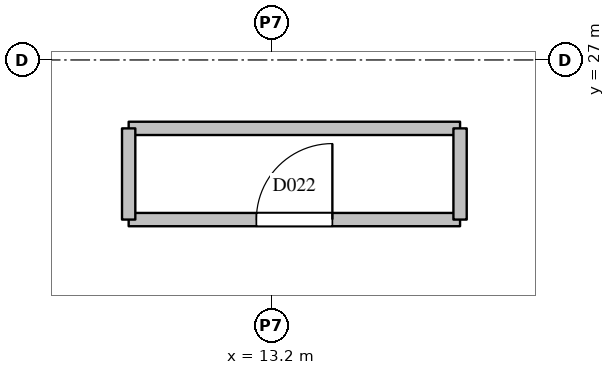
"""IFC4 building model, lengths in metres.
Left out: names, types, materials, properties, quantities, classifications, styles, units other than length and angle.
Written with IfcOpenShell. Run it as: python <this file> out.ifc"""

import sys

from ifc_helpers import new_model, si_unit, direction, frame, frame_2d, origin, place, context, subcontext, project, spatial, rectangle, extrude, element, fill, save


model = new_model("IFC4")
c1 = context("Model", 3, precision=1e-05, world=origin(), true_north=direction((0.0, 1.0)))
c2 = subcontext(c1, "Body", "Model", "MODEL_VIEW")
j1 = project(units=[si_unit("LENGTHUNIT", "METRE"), si_unit("PLANEANGLEUNIT", "RADIAN")], contexts=[c1])
p1 = place(None, origin())
s1 = spatial("IfcSite", under=j1, at=p1, CompositionType="ELEMENT")
p2 = place(p1, origin())
s2 = spatial("IfcBuilding", under=s1, at=p2, CompositionType="ELEMENT")
p3 = place(p2, frame((0.0, 0.0, 50.0)))
s3 = spatial("IfcBuildingStorey", under=s2, at=p3, CompositionType="ELEMENT", Elevation=50.0)
p4 = place(p3, frame((11.32, 24.9, 0.0), z_axis=(0.0, 0.0, 1.0), x_axis=(1.0, 0.0, 0.0)))
e1 = element("IfcWall", 1, at=p4, inside=s3, PredefinedType="PARTITIONING", context=c2, shape_type="SweptSolid", body=[
    extrude(rectangle(XDim=4.36, YDim=0.175, at=frame_2d((2.18, 0.0))), origin(), (0.0, 0.0, 1.0), 3.5),
])
p5 = place(p4, frame((1.68, 0.0, 0.0)))
e2 = element("IfcOpeningElement", 2, at=p5, cuts=e1, PredefinedType="OPENING", context=c2, shape_type="SweptSolid", body=[
    extrude(rectangle(XDim=1.0, YDim=2.1, at=frame_2d((0.5, 1.05))), frame((0.0, 0.097, 0.0), z_axis=(0.0, -1.0, 0.0), x_axis=(1.0, 0.0, 0.0)), (0.0, 0.0, 1.0), 0.195),
])
p6 = place(p3, frame((11.32, 26.1, 0.0), z_axis=(0.0, 0.0, 1.0), x_axis=(1.0, 0.0, 0.0)))
e3 = element("IfcWall", 3, at=p6, inside=s3, PredefinedType="PARTITIONING", context=c2, shape_type="SweptSolid", body=[
    extrude(rectangle(XDim=4.36, YDim=0.175, at=frame_2d((2.18, 0.0))), origin(), (0.0, 0.0, 1.0), 3.5),
])
for number, where, z_axis, x_axis in (
    (4, (11.32, 24.9, 0.0), (0.0, 0.0, 1.0), (0.0, 1.0, 0.0)),
    (5, (15.68, 24.9, 0.0), (0.0, 0.0, 1.0), (0.0, 1.0, 0.0)),
):
    element("IfcWall", number, at=place(p3, frame(where, z_axis=z_axis, x_axis=x_axis)), inside=s3, PredefinedType="PARTITIONING", context=c2, shape_type="SweptSolid", body=[
        extrude(rectangle(XDim=1.2, YDim=0.175, at=frame_2d((0.6, 0.0))), origin(), (0.0, 0.0, 1.0), 3.5),
    ])
p7 = place(p5, origin())
e6 = element("IfcDoor", 6, at=p7, inside=s3, OperationType="SINGLE_SWING_RIGHT", PredefinedType="DOOR", context=c2, shape_type="SweptSolid", body=[
    extrude(rectangle(XDim=1.0, YDim=2.1, at=frame_2d((0.5, 1.05))), frame((0.0, 0.025, 0.0), z_axis=(0.0, -1.0, 0.0), x_axis=(1.0, 0.0, 0.0)), (0.0, 0.0, 1.0), 0.05),
])
fill(e2, e6)
save(model, sys.argv[1])
